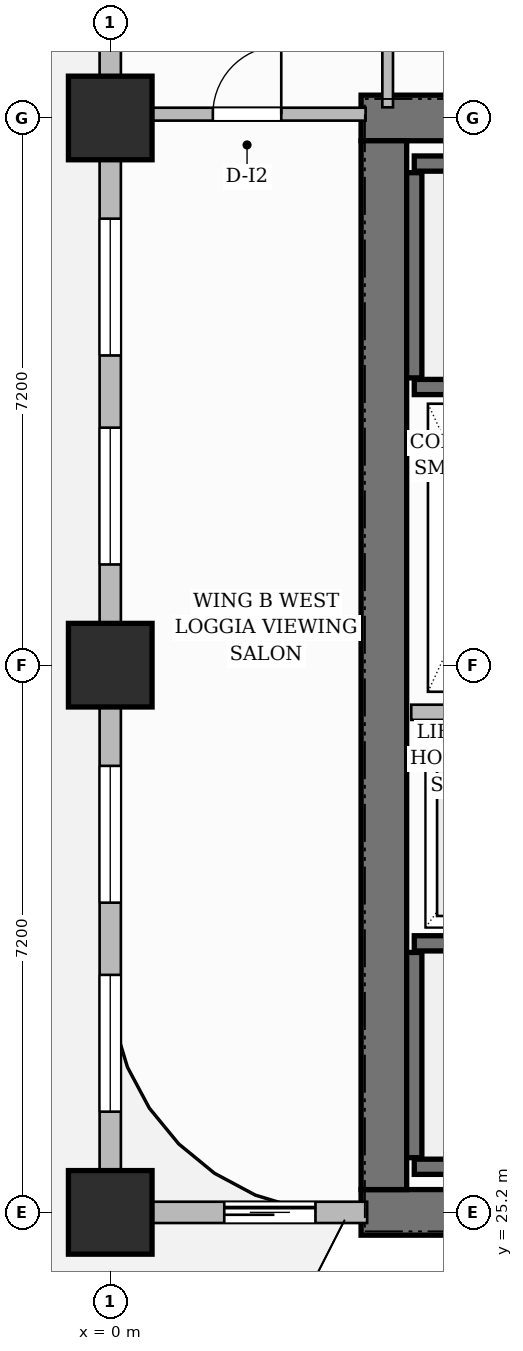
"""IFC4 building model, lengths in metres.
Left out: names, types, materials, properties, quantities, classifications, styles, units other than length and angle.
Written with IfcOpenShell. Run it as: python <this file> out.ifc"""

import sys

from ifc_helpers import new_model, si_unit, direction, frame, frame_2d, origin, origin_2d, place, context, subcontext, project, spatial, rectangle, extrude, source, transform, mapped, element, fill, save


model = new_model("IFC4")
c1 = context("Model", 3, precision=1e-05, world=origin(), true_north=direction((0.0, 1.0)))
c2 = subcontext(c1, "Body", "Model", "MODEL_VIEW")
j1 = project(units=[si_unit("LENGTHUNIT", "METRE"), si_unit("PLANEANGLEUNIT", "RADIAN")], contexts=[c1])
p1 = place(None, origin())
s1 = spatial("IfcSite", under=j1, at=p1, CompositionType="ELEMENT")
p2 = place(p1, origin())
s2 = spatial("IfcBuilding", under=s1, at=p2, CompositionType="ELEMENT")
p3 = place(p2, frame((0.0, 0.0, 50.9)))
s3 = spatial("IfcBuildingStorey", under=s2, at=p3, CompositionType="ELEMENT", Elevation=50.9)
for number, where, z_axis, x_axis in (
    (1, (3.3, 25.2, 0.0), (0.0, 0.0, 1.0), (1.0, 0.0, 0.0)),
    (2, (3.3, 39.6, 0.0), (0.0, 0.0, 1.0), (1.0, 0.0, 0.0)),
):
    element("IfcWall", number, at=place(p3, frame(where, z_axis=z_axis, x_axis=x_axis)), inside=s3, PredefinedType="SHEAR", context=c2, shape_type="SweptSolid", body=[
        extrude(rectangle(XDim=8.4, YDim=0.6, at=frame_2d((4.2, 0.0))), origin(), (0.0, 0.0, 1.0), 3.7),
    ])
p4 = place(p3, frame((3.6, 25.5, 0.0), z_axis=(0.0, 0.0, 1.0), x_axis=(0.0, 1.0, 0.0)))
e3 = element("IfcWall", 3, at=p4, inside=s3, PredefinedType="SHEAR", context=c2, shape_type="SweptSolid", body=[
    extrude(rectangle(XDim=13.8, YDim=0.6, at=frame_2d((6.9, 0.0))), origin(), (0.0, 0.0, 1.0), 3.7),
])
m1 = source(origin(), c2, "Body", "SweptSolid", [
    extrude(rectangle(XDim=1.1, YDim=1.1, at=origin_2d()), origin(), (0.0, 0.0, 1.0), 3.7),
])
for number, where, z_axis, x_axis in (
    (4, (0.0, 25.2, 0.0), (0.0, 0.0, 1.0), (1.0, 0.0, 0.0)),
    (5, (0.0, 32.4, 0.0), (0.0, 0.0, 1.0), (1.0, 0.0, 0.0)),
    (6, (0.0, 39.6, 0.0), (0.0, 0.0, 1.0), (1.0, 0.0, 0.0)),
):
    element("IfcColumn", number, at=place(p3, frame(where, z_axis=z_axis, x_axis=x_axis)), inside=s3, PredefinedType="COLUMN", context=c2, shape_type="MappedRepresentation", body=[
        mapped(m1, transform((0.0, 0.0, 0.0), scale=1.0)),
    ])
p5 = place(p3, frame((4.0, 25.8, 0.0), z_axis=(0.0, 0.0, 1.0), x_axis=(1.0, 0.0, 0.0)))
e7 = element("IfcWall", 7, at=p5, inside=s3, PredefinedType="SHEAR", context=c2, shape_type="SweptSolid", body=[
    extrude(rectangle(XDim=7.1, YDim=0.2, at=frame_2d((3.55, 0.0))), origin(), (0.0, 0.0, 1.0), 3.7),
])
p6 = place(p3, frame((4.0, 25.92, 0.0), z_axis=(0.0, 0.0, 1.0), x_axis=(0.0, 1.0, 0.0)))
e8 = element("IfcWall", 8, at=p6, inside=s3, PredefinedType="SHEAR", context=c2, shape_type="SweptSolid", body=[
    extrude(rectangle(XDim=2.7, YDim=0.2, at=frame_2d((1.35, 0.0))), origin(), (0.0, 0.0, 1.0), 3.7),
])
p7 = place(p3, frame((4.0, 28.74, 0.0), z_axis=(0.0, 0.0, 1.0), x_axis=(1.0, 0.0, 0.0)))
e9 = element("IfcWall", 9, at=p7, inside=s3, PredefinedType="SHEAR", context=c2, shape_type="SweptSolid", body=[
    extrude(rectangle(XDim=7.1, YDim=0.2, at=frame_2d((3.55, 0.0))), origin(), (0.0, 0.0, 1.0), 3.7),
])
p8 = place(p7, frame((5.815, 0.0, 0.0)))
e10 = element("IfcOpeningElement", 10, at=p8, cuts=e9, PredefinedType="OPENING", context=c2, shape_type="SweptSolid", body=[
    extrude(rectangle(XDim=1.05, YDim=2.2, at=frame_2d((0.525, 1.1))), frame((0.0, 0.11, 0.0), z_axis=(0.0, -1.0, 0.0), x_axis=(1.0, 0.0, 0.0)), (0.0, 0.0, 1.0), 0.22),
])
p9 = place(p3, frame((4.0, 39.0, 0.0), z_axis=(0.0, 0.0, 1.0), x_axis=(1.0, 0.0, 0.0)))
e11 = element("IfcWall", 11, at=p9, inside=s3, PredefinedType="SHEAR", context=c2, shape_type="SweptSolid", body=[
    extrude(rectangle(XDim=7.1, YDim=0.2, at=frame_2d((3.55, 0.0))), origin(), (0.0, 0.0, 1.0), 3.7),
])
p10 = place(p3, frame((4.0, 36.18, 0.0), z_axis=(0.0, 0.0, 1.0), x_axis=(0.0, 1.0, 0.0)))
e12 = element("IfcWall", 12, at=p10, inside=s3, PredefinedType="SHEAR", context=c2, shape_type="SweptSolid", body=[
    extrude(rectangle(XDim=2.7, YDim=0.2, at=frame_2d((1.35, 0.0))), origin(), (0.0, 0.0, 1.0), 3.7),
])
p11 = place(p3, frame((4.0, 36.06, 0.0), z_axis=(0.0, 0.0, 1.0), x_axis=(1.0, 0.0, 0.0)))
e13 = element("IfcWall", 13, at=p11, inside=s3, PredefinedType="SHEAR", context=c2, shape_type="SweptSolid", body=[
    extrude(rectangle(XDim=7.1, YDim=0.2, at=frame_2d((3.55, 0.0))), origin(), (0.0, 0.0, 1.0), 3.7),
])
p12 = place(p11, frame((5.815, 0.0, 0.0)))
e14 = element("IfcOpeningElement", 14, at=p12, cuts=e13, PredefinedType="OPENING", context=c2, shape_type="SweptSolid", body=[
    extrude(rectangle(XDim=1.05, YDim=2.2, at=frame_2d((0.525, 1.1))), frame((0.0, 0.11, 0.0), z_axis=(0.0, -1.0, 0.0), x_axis=(1.0, 0.0, 0.0)), (0.0, 0.0, 1.0), 0.22),
])
p13 = place(p3, frame((3.96, 31.78, 0.0), z_axis=(0.0, 0.0, 1.0), x_axis=(1.0, 0.0, 0.0)))
e15 = element("IfcWall", 15, at=p13, inside=s3, PredefinedType="PARTITIONING", context=c2, shape_type="SweptSolid", body=[
    extrude(rectangle(XDim=2.13, YDim=0.2, at=frame_2d((1.065, 0.0))), origin(), (0.0, 0.0, 1.0), 3.45),
])
p14 = place(p3, frame((0.24, 39.65, 0.0), z_axis=(0.0, 0.0, 1.0), x_axis=(1.0, 0.0, 0.0)))
e16 = element("IfcWall", 16, at=p14, inside=s3, PredefinedType="PARTITIONING", context=c2, shape_type="SweptSolid", body=[
    extrude(rectangle(XDim=3.12, YDim=0.17, at=frame_2d((1.56, 0.0))), origin(), (0.0, 0.0, 1.0), 3.45),
])
p15 = place(p14, frame((1.11, 0.0, 0.0)))
e17 = element("IfcOpeningElement", 17, at=p15, cuts=e16, PredefinedType="OPENING", context=c2, shape_type="SweptSolid", body=[
    extrude(rectangle(XDim=0.9, YDim=2.15, at=frame_2d((0.45, 1.075))), frame((0.0, 0.095, 0.0), z_axis=(0.0, -1.0, 0.0), x_axis=(1.0, 0.0, 0.0)), (0.0, 0.0, 1.0), 0.19),
])
p16 = place(p3, frame((3.65, 39.74, 0.0), z_axis=(0.0, 0.0, 1.0), x_axis=(0.0, 1.0, 0.0)))
e18 = element("IfcWall", 18, at=p16, inside=s3, PredefinedType="PARTITIONING", context=c2, shape_type="SweptSolid", body=[
    extrude(rectangle(XDim=1.965, YDim=0.14, at=frame_2d((0.982, 0.0))), origin(), (0.0, 0.0, 1.0), 3.45),
])
p17 = place(p3, frame((0.0, 25.2, 0.0), z_axis=(0.0, 0.0, 1.0), x_axis=(1.0, 0.0, 0.0)))
e19 = element("IfcWall", 19, at=p17, inside=s3, PredefinedType="SOLIDWALL", context=c2, shape_type="SweptSolid", body=[
    extrude(rectangle(XDim=3.38, YDim=0.28, at=frame_2d((1.69, 0.0))), origin(), (0.0, 0.0, 1.0), 3.45),
])
p18 = place(p17, frame((1.5, 0.0, 0.0)))
e20 = element("IfcOpeningElement", 20, at=p18, cuts=e19, PredefinedType="OPENING", context=c2, shape_type="SweptSolid", body=[
    extrude(rectangle(XDim=1.2, YDim=2.2, at=frame_2d((0.6, 1.1))), frame((0.0, 0.15, 0.0), z_axis=(0.0, -1.0, 0.0), x_axis=(1.0, 0.0, 0.0)), (0.0, 0.0, 1.0), 0.3),
])
p19 = place(p3, frame((0.0, 25.25, 0.0), z_axis=(0.0, 0.0, 1.0), x_axis=(0.0, 1.0, 0.0)))
e21 = element("IfcWall", 21, at=p19, inside=s3, PredefinedType="SOLIDWALL", context=c2, shape_type="SweptSolid", body=[
    extrude(rectangle(XDim=21.5, YDim=0.28, at=frame_2d((10.75, 0.0))), origin(), (0.0, 0.0, 1.0), 2.885),
])
p20 = place(p19, frame((1.275, 0.0, 0.8)))
e22 = element("IfcOpeningElement", 22, at=p20, cuts=e21, PredefinedType="OPENING", context=c2, shape_type="SweptSolid", body=[
    extrude(rectangle(XDim=1.8, YDim=1.85, at=frame_2d((0.9, 0.925))), frame((0.0, 0.15, 0.0), z_axis=(0.0, -1.0, 0.0), x_axis=(1.0, 0.0, 0.0)), (0.0, 0.0, 1.0), 0.3),
])
p21 = place(p19, frame((4.025, 0.0, 0.8)))
e23 = element("IfcOpeningElement", 23, at=p21, cuts=e21, PredefinedType="OPENING", context=c2, shape_type="SweptSolid", body=[
    extrude(rectangle(XDim=1.8, YDim=1.85, at=frame_2d((0.9, 0.925))), frame((0.0, 0.15, 0.0), z_axis=(0.0, -1.0, 0.0), x_axis=(1.0, 0.0, 0.0)), (0.0, 0.0, 1.0), 0.3),
])
p22 = place(p19, frame((8.475, 0.0, 0.8)))
e24 = element("IfcOpeningElement", 24, at=p22, cuts=e21, PredefinedType="OPENING", context=c2, shape_type="SweptSolid", body=[
    extrude(rectangle(XDim=1.8, YDim=1.85, at=frame_2d((0.9, 0.925))), frame((0.0, 0.15, 0.0), z_axis=(0.0, -1.0, 0.0), x_axis=(1.0, 0.0, 0.0)), (0.0, 0.0, 1.0), 0.3),
])
p23 = place(p19, frame((11.225, 0.0, 0.8)))
e25 = element("IfcOpeningElement", 25, at=p23, cuts=e21, PredefinedType="OPENING", context=c2, shape_type="SweptSolid", body=[
    extrude(rectangle(XDim=1.8, YDim=1.85, at=frame_2d((0.9, 0.925))), frame((0.0, 0.15, 0.0), z_axis=(0.0, -1.0, 0.0), x_axis=(1.0, 0.0, 0.0)), (0.0, 0.0, 1.0), 0.3),
])
p24 = place(p19, frame((15.821, 0.0, 0.8)))
e26 = element("IfcOpeningElement", 26, at=p24, cuts=e21, PredefinedType="OPENING", context=c2, shape_type="SweptSolid", body=[
    extrude(rectangle(XDim=1.8, YDim=1.85, at=frame_2d((0.9, 0.925))), frame((0.0, 0.15, 0.0), z_axis=(0.0, -1.0, 0.0), x_axis=(1.0, 0.0, 0.0)), (0.0, 0.0, 1.0), 0.3),
])
p25 = place(p19, frame((18.829, 0.0, 0.8)))
e27 = element("IfcOpeningElement", 27, at=p25, cuts=e21, PredefinedType="OPENING", context=c2, shape_type="SweptSolid", body=[
    extrude(rectangle(XDim=1.4, YDim=1.85, at=frame_2d((0.7, 0.925))), frame((0.0, 0.15, 0.0), z_axis=(0.0, -1.0, 0.0), x_axis=(1.0, 0.0, 0.0)), (0.0, 0.0, 1.0), 0.3),
])
m2 = source(origin(), c2, "Body", "SweptSolid", [
    extrude(rectangle(XDim=0.9, YDim=2.15, at=frame_2d((0.45, 1.075))), frame((0.0, 0.025, 0.0), z_axis=(0.0, -1.0, 0.0), x_axis=(1.0, 0.0, 0.0)), (0.0, 0.0, 1.0), 0.05),
])
p26 = place(p15, origin())
e28 = element("IfcDoor", 28, at=p26, inside=s3, OperationType="SINGLE_SWING_RIGHT", PredefinedType="DOOR", context=c2, shape_type="MappedRepresentation", body=[
    mapped(m2, transform((0.0, 0.0, 0.0), scale=1.0)),
])
fill(e17, e28)
m3 = source(origin(), c2, "Body", "SweptSolid", [
    extrude(rectangle(XDim=1.2, YDim=2.2, at=frame_2d((0.6, 1.1))), frame((0.0, 0.025, 0.0), z_axis=(0.0, -1.0, 0.0), x_axis=(1.0, 0.0, 0.0)), (0.0, 0.0, 1.0), 0.05),
])
p27 = place(p18, origin())
e29 = element("IfcDoor", 29, at=p27, inside=s3, OperationType="SLIDING_TO_LEFT", PredefinedType="DOOR", context=c2, shape_type="MappedRepresentation", body=[
    mapped(m3, transform((0.0, 0.0, 0.0), scale=1.0)),
])
fill(e20, e29)
m4 = source(origin(), c2, "Body", "SweptSolid", [
    extrude(rectangle(XDim=1.8, YDim=1.85, at=frame_2d((0.9, 0.925))), frame((0.0, 0.03, 0.0), z_axis=(0.0, -1.0, 0.0), x_axis=(1.0, 0.0, 0.0)), (0.0, 0.0, 1.0), 0.06),
])
p28 = place(p20, origin())
e30 = element("IfcWindow", 30, at=p28, inside=s3, PartitioningType="DOUBLE_PANEL_VERTICAL", PredefinedType="WINDOW", context=c2, shape_type="MappedRepresentation", body=[
    mapped(m4, transform((0.0, 0.0, 0.0), scale=1.0)),
])
fill(e22, e30)
p29 = place(p21, origin())
e31 = element("IfcWindow", 31, at=p29, inside=s3, PartitioningType="DOUBLE_PANEL_VERTICAL", PredefinedType="WINDOW", context=c2, shape_type="MappedRepresentation", body=[
    mapped(m4, transform((0.0, 0.0, 0.0), scale=1.0)),
])
fill(e23, e31)
p30 = place(p22, origin())
e32 = element("IfcWindow", 32, at=p30, inside=s3, PartitioningType="DOUBLE_PANEL_VERTICAL", PredefinedType="WINDOW", context=c2, shape_type="MappedRepresentation", body=[
    mapped(m4, transform((0.0, 0.0, 0.0), scale=1.0)),
])
fill(e24, e32)
p31 = place(p23, origin())
e33 = element("IfcWindow", 33, at=p31, inside=s3, PartitioningType="DOUBLE_PANEL_VERTICAL", PredefinedType="WINDOW", context=c2, shape_type="MappedRepresentation", body=[
    mapped(m4, transform((0.0, 0.0, 0.0), scale=1.0)),
])
fill(e25, e33)
save(model, sys.argv[1])
